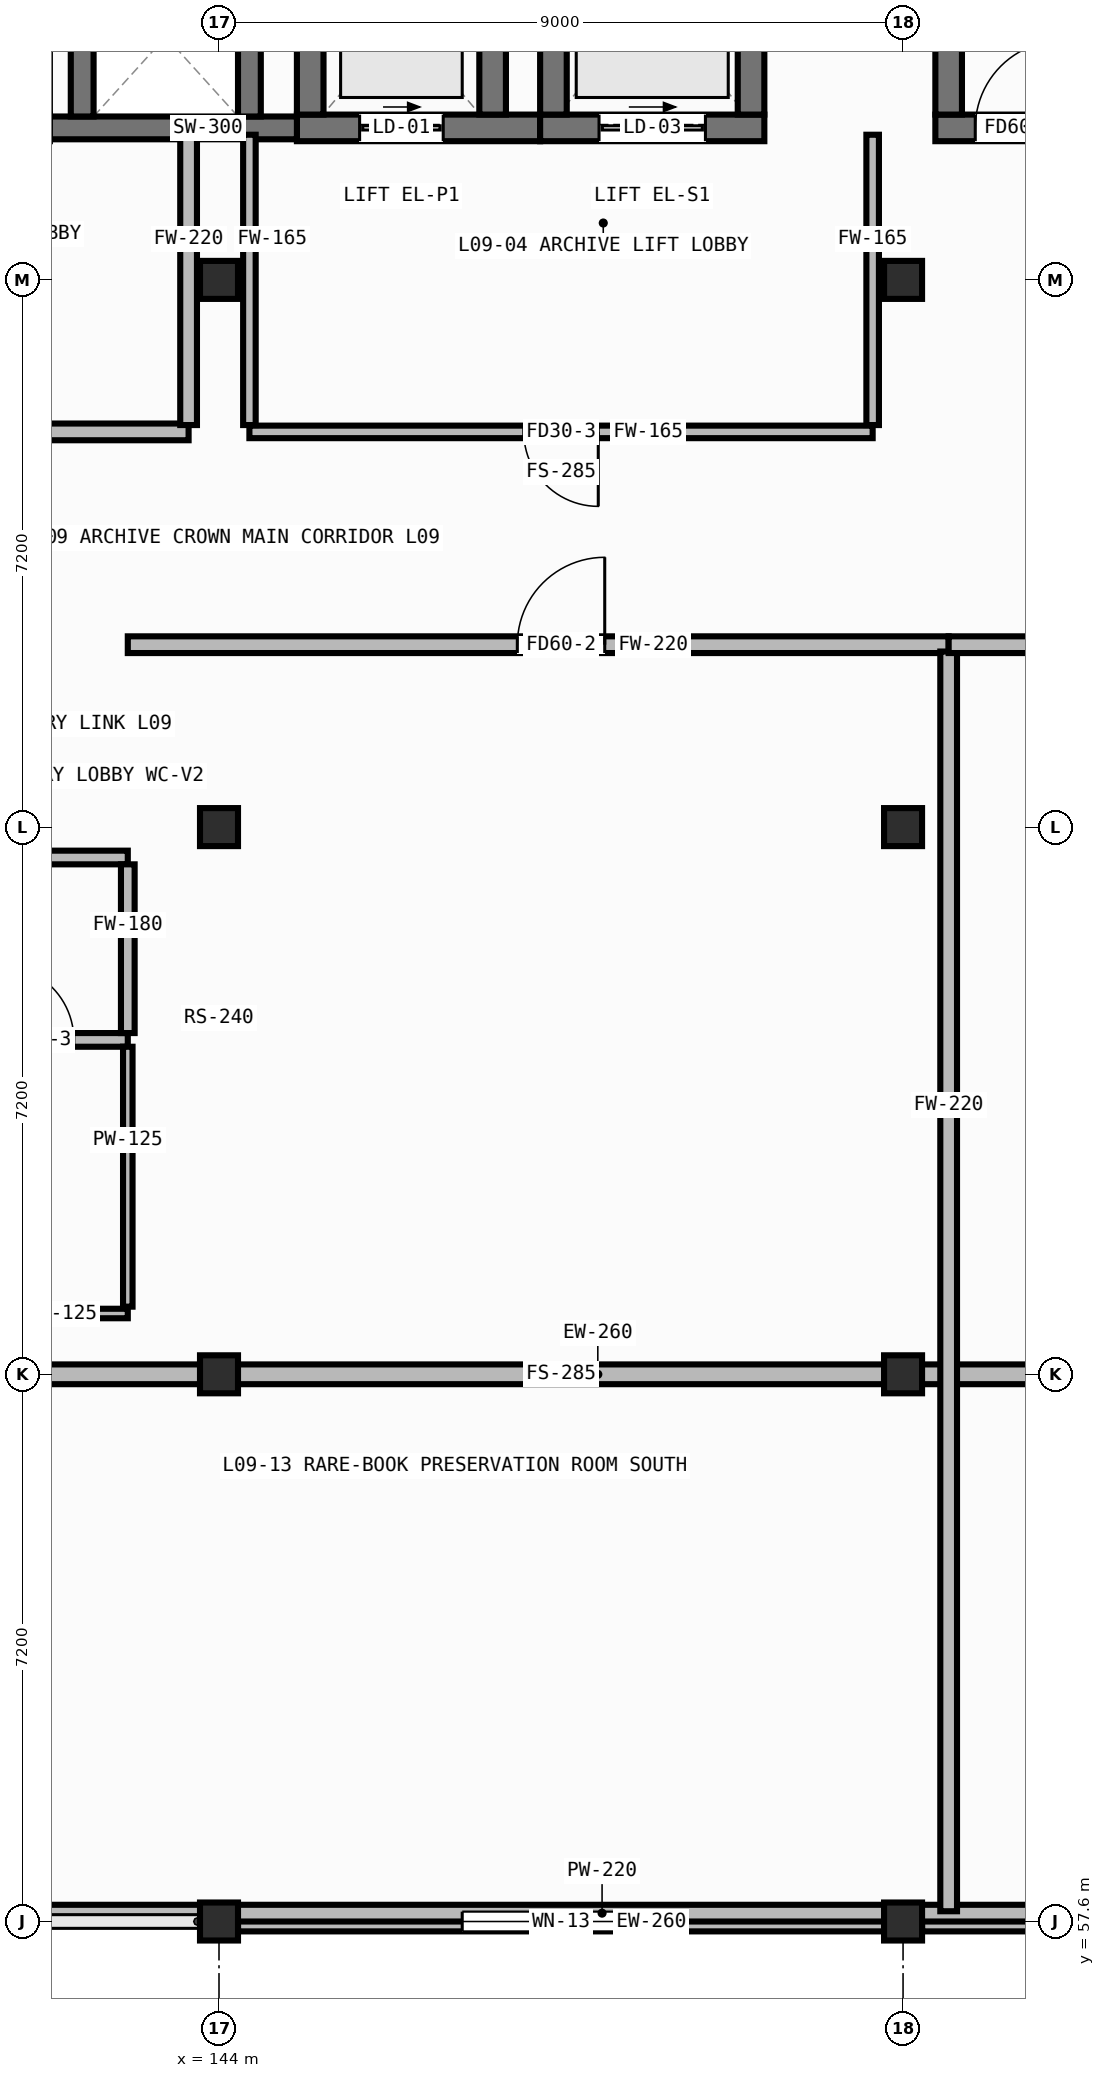
"""IFC4 building model, lengths in metres.
Left out: names, types, materials, properties, quantities, classifications, styles, units other than length and angle.
Written with IfcOpenShell. Run it as: python <this file> out.ifc"""

import sys

from ifc_helpers import new_model, si_unit, direction, frame, frame_2d, origin, origin_2d, place, context, subcontext, project, spatial, rectangle, hollow_rectangle, extrude, element, fill, save


model = new_model("IFC4")
c1 = context("Model", 3, precision=1e-05, world=origin(), true_north=direction((0.0, 1.0)))
c2 = subcontext(c1, "Body", "Model", "MODEL_VIEW")
j1 = project(units=[si_unit("LENGTHUNIT", "METRE"), si_unit("PLANEANGLEUNIT", "RADIAN")], contexts=[c1])
p1 = place(None, origin())
s1 = spatial("IfcSite", under=j1, at=p1, CompositionType="ELEMENT")
p2 = place(p1, origin())
s2 = spatial("IfcBuilding", under=s1, at=p2, CompositionType="ELEMENT")
p3 = place(p2, frame((0.0, 0.0, 31.4)))
s3 = spatial("IfcBuildingStorey", under=s2, at=p3, CompositionType="ELEMENT", Elevation=31.4)
for number, where, z_axis, x_axis in (
    (1, (144.0, 57.6, 0.0), (0.0, 0.0, 1.0), (1.0, 0.0, 0.0)),
    (2, (144.0, 64.8, 0.0), (0.0, 0.0, 1.0), (1.0, 0.0, 0.0)),
    (3, (144.0, 72.0, 0.0), (0.0, 0.0, 1.0), (1.0, 0.0, 0.0)),
    (4, (144.0, 79.2, 0.0), (0.0, 0.0, 1.0), (1.0, 0.0, 0.0)),
    (5, (153.0, 57.6, 0.0), (0.0, 0.0, 1.0), (1.0, 0.0, 0.0)),
    (6, (153.0, 64.8, 0.0), (0.0, 0.0, 1.0), (1.0, 0.0, 0.0)),
    (7, (153.0, 72.0, 0.0), (0.0, 0.0, 1.0), (1.0, 0.0, 0.0)),
    (8, (153.0, 79.2, 0.0), (0.0, 0.0, 1.0), (1.0, 0.0, 0.0)),
):
    element("IfcColumn", number, at=place(p3, frame(where, z_axis=z_axis, x_axis=x_axis)), inside=s3, PredefinedType="COLUMN", context=c2, shape_type="SweptSolid", body=[
        extrude(hollow_rectangle(XDim=0.5, YDim=0.5, WallThickness=0.022, at=origin_2d()), origin(), (0.0, 0.0, 1.0), 3.56),
    ])
p4 = place(p3, frame((144.25, 57.6, 0.0), z_axis=(0.0, 0.0, 1.0), x_axis=(1.0, 0.0, 0.0)))
e9 = element("IfcWall", 9, at=p4, inside=s3, PredefinedType="STANDARD", context=c2, shape_type="SweptSolid", body=[
    extrude(rectangle(XDim=8.5, YDim=0.26, at=frame_2d((4.25, 0.0))), origin(), (0.0, 0.0, 1.0), 3.16),
])
p5 = place(p4, frame((2.95, 0.0, 0.85)))
e10 = element("IfcOpeningElement", 10, at=p5, cuts=e9, PredefinedType="OPENING", context=c2, shape_type="SweptSolid", body=[
    extrude(rectangle(XDim=2.6, YDim=1.6, at=frame_2d((1.3, 0.8))), frame((0.0, 0.142, 0.0), z_axis=(0.0, -1.0, 0.0), x_axis=(1.0, 0.0, 0.0)), (0.0, 0.0, 1.0), 0.284),
])
p6 = place(p3, frame((153.25, 57.6, 0.0), z_axis=(0.0, 0.0, 1.0), x_axis=(1.0, 0.0, 0.0)))
e11 = element("IfcWall", 11, at=p6, inside=s3, PredefinedType="STANDARD", context=c2, shape_type="SweptSolid", body=[
    extrude(rectangle(XDim=8.525, YDim=0.26, at=frame_2d((4.262, 0.0))), origin(), (0.0, 0.0, 1.0), 3.16),
])
p7 = place(p6, frame((2.962, 0.0, 0.85)))
e12 = element("IfcOpeningElement", 12, at=p7, cuts=e11, PredefinedType="OPENING", context=c2, shape_type="SweptSolid", body=[
    extrude(rectangle(XDim=2.6, YDim=1.6, at=frame_2d((1.3, 0.8))), frame((0.0, 0.142, 0.0), z_axis=(0.0, -1.0, 0.0), x_axis=(1.0, 0.0, 0.0)), (0.0, 0.0, 1.0), 0.284),
])
p8 = place(p3, frame((126.2, 64.8, 3.8), z_axis=(0.0, 0.0, 1.0), x_axis=(1.0, 0.0, 0.0)))
e13 = element("IfcWall", 13, at=p8, inside=s3, PredefinedType="STANDARD", context=c2, shape_type="SweptSolid", body=[
    extrude(rectangle(XDim=35.6, YDim=0.26, at=frame_2d((17.8, 0.0))), origin(), (0.0, 0.0, 1.0), 1.92),
])
p9 = place(p3, frame((126.0, 57.71, 3.8), z_axis=(0.0, 0.0, 1.0), x_axis=(1.0, 0.0, 0.0)))
e14 = element("IfcWall", 14, at=p9, inside=s3, PredefinedType="PARAPET", context=c2, shape_type="SweptSolid", body=[
    extrude(rectangle(XDim=36.0, YDim=0.22, at=frame_2d((18.0, 0.0))), origin(), (0.0, 0.0, 1.0), 0.9),
])
p10 = place(p3, frame((153.425, 81.2, 0.0), z_axis=(0.0, 0.0, 1.0), x_axis=(1.0, 0.0, 0.0)))
e15 = element("IfcWall", 15, at=p10, inside=s3, PredefinedType="SHEAR", context=c2, shape_type="SweptSolid", body=[
    extrude(rectangle(XDim=8.15, YDim=0.35, at=frame_2d((4.075, 0.0))), origin(), (0.0, 0.0, 1.0), 3.56),
])
p11 = place(p10, frame((0.525, 0.0, 0.0)))
e16 = element("IfcOpeningElement", 16, at=p11, cuts=e15, PredefinedType="OPENING", context=c2, shape_type="SweptSolid", body=[
    extrude(rectangle(XDim=1.15, YDim=2.1, at=frame_2d((0.575, 1.05))), frame((0.0, 0.187, 0.0), z_axis=(0.0, -1.0, 0.0), x_axis=(1.0, 0.0, 0.0)), (0.0, 0.0, 1.0), 0.374),
])
p12 = place(p3, frame((153.6, 81.375, 0.0), z_axis=(0.0, 0.0, 1.0), x_axis=(0.0, 1.0, 0.0)))
e17 = element("IfcWall", 17, at=p12, inside=s3, PredefinedType="SHEAR", context=c2, shape_type="SweptSolid", body=[
    extrude(rectangle(XDim=3.55, YDim=0.35, at=frame_2d((1.775, 0.0))), origin(), (0.0, 0.0, 1.0), 3.56),
])
p13 = place(p3, frame((145.025, 81.2, 0.0), z_axis=(0.0, 0.0, 1.0), x_axis=(1.0, 0.0, 0.0)))
e18 = element("IfcWall", 18, at=p13, inside=s3, PredefinedType="SHEAR", context=c2, shape_type="SweptSolid", body=[
    extrude(rectangle(XDim=3.2, YDim=0.35, at=frame_2d((1.6, 0.0))), origin(), (0.0, 0.0, 1.0), 4.25),
])
p14 = place(p13, frame((0.825, 0.0, 0.0)))
e19 = element("IfcOpeningElement", 19, at=p14, cuts=e18, PredefinedType="OPENING", context=c2, shape_type="SweptSolid", body=[
    extrude(rectangle(XDim=1.1, YDim=2.1, at=frame_2d((0.55, 1.05))), frame((0.0, 0.187, 0.0), z_axis=(0.0, -1.0, 0.0), x_axis=(1.0, 0.0, 0.0)), (0.0, 0.0, 1.0), 0.374),
])
for number, where, z_axis, x_axis in (
    (20, (145.2, 81.375, 0.0), (0.0, 0.0, 1.0), (0.0, 1.0, 0.0)),
    (21, (147.6, 81.375, 0.0), (0.0, 0.0, 1.0), (0.0, 1.0, 0.0)),
):
    element("IfcWall", number, at=place(p3, frame(where, z_axis=z_axis, x_axis=x_axis)), inside=s3, PredefinedType="SHEAR", context=c2, shape_type="SweptSolid", body=[
        extrude(rectangle(XDim=2.45, YDim=0.35, at=frame_2d((1.225, 0.0))), origin(), (0.0, 0.0, 1.0), 4.25),
    ])
p15 = place(p3, frame((148.225, 81.2, 0.0), z_axis=(0.0, 0.0, 1.0), x_axis=(1.0, 0.0, 0.0)))
e22 = element("IfcWall", 22, at=p15, inside=s3, PredefinedType="SHEAR", context=c2, shape_type="SweptSolid", body=[
    extrude(rectangle(XDim=2.95, YDim=0.35, at=frame_2d((1.475, 0.0))), origin(), (0.0, 0.0, 1.0), 4.25),
])
p16 = place(p15, frame((0.775, 0.0, 0.0)))
e23 = element("IfcOpeningElement", 23, at=p16, cuts=e22, PredefinedType="OPENING", context=c2, shape_type="SweptSolid", body=[
    extrude(rectangle(XDim=1.4, YDim=2.15, at=frame_2d((0.7, 1.075))), frame((0.0, 0.187, 0.0), z_axis=(0.0, -1.0, 0.0), x_axis=(1.0, 0.0, 0.0)), (0.0, 0.0, 1.0), 0.374),
])
for number, where, z_axis, x_axis in (
    (24, (148.4, 81.375, 0.0), (0.0, 0.0, 1.0), (0.0, 1.0, 0.0)),
    (25, (151.0, 81.375, 0.0), (0.0, 0.0, 1.0), (0.0, 1.0, 0.0)),
):
    element("IfcWall", number, at=place(p3, frame(where, z_axis=z_axis, x_axis=x_axis)), inside=s3, PredefinedType="SHEAR", context=c2, shape_type="SweptSolid", body=[
        extrude(rectangle(XDim=3.05, YDim=0.35, at=frame_2d((1.525, 0.0))), origin(), (0.0, 0.0, 1.0), 4.25),
    ])
p17 = place(p3, frame((141.775, 81.2, 0.0), z_axis=(0.0, 0.0, 1.0), x_axis=(1.0, 0.0, 0.0)))
e26 = element("IfcWall", 26, at=p17, inside=s3, PredefinedType="SHEAR", context=c2, shape_type="SweptSolid", body=[
    extrude(rectangle(XDim=3.25, YDim=0.3, at=frame_2d((1.625, 0.0))), origin(), (0.0, 0.0, 1.0), 3.56),
])
for number, where, z_axis, x_axis in (
    (27, (142.2, 81.35, 0.0), (0.0, 0.0, 1.0), (0.0, 1.0, 0.0)),
    (28, (144.4, 81.35, 0.0), (0.0, 0.0, 1.0), (0.0, 1.0, 0.0)),
):
    element("IfcWall", number, at=place(p3, frame(where, z_axis=z_axis, x_axis=x_axis)), inside=s3, PredefinedType="SHEAR", context=c2, shape_type="SweptSolid", body=[
        extrude(rectangle(XDim=2.1, YDim=0.3, at=frame_2d((1.05, 0.0))), origin(), (0.0, 0.0, 1.0), 3.56),
    ])
p18 = place(p3, frame((135.8, 77.2, 0.0), z_axis=(0.0, 0.0, 1.0), x_axis=(1.0, 0.0, 0.0)))
e29 = element("IfcWall", 29, at=p18, inside=s3, PredefinedType="PARTITIONING", context=c2, shape_type="SweptSolid", body=[
    extrude(rectangle(XDim=7.8, YDim=0.22, at=frame_2d((3.9, 0.0))), origin(), (0.0, 0.0, 1.0), 3.56),
])
p19 = place(p18, frame((3.175, 0.0, 0.0)))
e30 = element("IfcOpeningElement", 30, at=p19, cuts=e29, PredefinedType="OPENING", context=c2, shape_type="SweptSolid", body=[
    extrude(rectangle(XDim=1.05, YDim=2.02, at=frame_2d((0.525, 1.01))), frame((0.0, 0.122, 0.0), z_axis=(0.0, -1.0, 0.0), x_axis=(1.0, 0.0, 0.0)), (0.0, 0.0, 1.0), 0.244),
])
p20 = place(p3, frame((143.6, 77.29, 0.0), z_axis=(0.0, 0.0, 1.0), x_axis=(0.0, 1.0, 0.0)))
e31 = element("IfcWall", 31, at=p20, inside=s3, PredefinedType="PARTITIONING", context=c2, shape_type="SweptSolid", body=[
    extrude(rectangle(XDim=3.82, YDim=0.22, at=frame_2d((1.91, 0.0))), origin(), (0.0, 0.0, 1.0), 3.56),
])
p21 = place(p3, frame((144.4, 77.2, 0.0), z_axis=(0.0, 0.0, 1.0), x_axis=(1.0, 0.0, 0.0)))
e32 = element("IfcWall", 32, at=p21, inside=s3, PredefinedType="PARTITIONING", context=c2, shape_type="SweptSolid", body=[
    extrude(rectangle(XDim=8.2, YDim=0.165, at=frame_2d((4.1, 0.0))), origin(), (0.0, 0.0, 1.0), 3.56),
])
p22 = place(p21, frame((3.61, 0.0, 0.0)))
e33 = element("IfcOpeningElement", 33, at=p22, cuts=e32, PredefinedType="OPENING", context=c2, shape_type="SweptSolid", body=[
    extrude(rectangle(XDim=0.98, YDim=2.02, at=frame_2d((0.49, 1.01))), frame((0.0, 0.094, 0.0), z_axis=(0.0, -1.0, 0.0), x_axis=(1.0, 0.0, 0.0)), (0.0, 0.0, 1.0), 0.189),
])
for number, where, z_axis, x_axis in (
    (34, (144.4, 77.29, 0.0), (0.0, 0.0, 1.0), (0.0, 1.0, 0.0)),
    (35, (152.6, 77.29, 0.0), (0.0, 0.0, 1.0), (0.0, 1.0, 0.0)),
):
    element("IfcWall", number, at=place(p3, frame(where, z_axis=z_axis, x_axis=x_axis)), inside=s3, PredefinedType="PARTITIONING", context=c2, shape_type="SweptSolid", body=[
        extrude(rectangle(XDim=3.82, YDim=0.165, at=frame_2d((1.91, 0.0))), origin(), (0.0, 0.0, 1.0), 3.56),
    ])
p23 = place(p3, frame((135.4, 69.2, 0.0), z_axis=(0.0, 0.0, 1.0), x_axis=(1.0, 0.0, 0.0)))
e36 = element("IfcWall", 36, at=p23, inside=s3, PredefinedType="PARTITIONING", context=c2, shape_type="SweptSolid", body=[
    extrude(rectangle(XDim=7.4, YDim=0.18, at=frame_2d((3.7, 0.0))), origin(), (0.0, 0.0, 1.0), 3.56),
])
p24 = place(p23, frame((0.75, 0.0, 0.0)))
e37 = element("IfcOpeningElement", 37, at=p24, cuts=e36, PredefinedType="OPENING", context=c2, shape_type="SweptSolid", body=[
    extrude(rectangle(XDim=1.0, YDim=2.08, at=frame_2d((0.5, 1.04))), frame((0.0, 0.102, 0.0), z_axis=(0.0, -1.0, 0.0), x_axis=(1.0, 0.0, 0.0)), (0.0, 0.0, 1.0), 0.204),
])
p25 = place(p23, frame((3.225, 0.0, 0.0)))
e38 = element("IfcOpeningElement", 38, at=p25, cuts=e36, PredefinedType="OPENING", context=c2, shape_type="SweptSolid", body=[
    extrude(rectangle(XDim=1.05, YDim=2.1, at=frame_2d((0.525, 1.05))), frame((0.0, 0.102, 0.0), z_axis=(0.0, -1.0, 0.0), x_axis=(1.0, 0.0, 0.0)), (0.0, 0.0, 1.0), 0.204),
])
p26 = place(p23, frame((5.71, 0.0, 0.0)))
e39 = element("IfcOpeningElement", 39, at=p26, cuts=e36, PredefinedType="OPENING", context=c2, shape_type="SweptSolid", body=[
    extrude(rectangle(XDim=0.98, YDim=2.02, at=frame_2d((0.49, 1.01))), frame((0.0, 0.102, 0.0), z_axis=(0.0, -1.0, 0.0), x_axis=(1.0, 0.0, 0.0)), (0.0, 0.0, 1.0), 0.204),
])
p27 = place(p3, frame((135.4, 71.6, 0.0), z_axis=(0.0, 0.0, 1.0), x_axis=(1.0, 0.0, 0.0)))
e40 = element("IfcWall", 40, at=p27, inside=s3, PredefinedType="PARTITIONING", context=c2, shape_type="SweptSolid", body=[
    extrude(rectangle(XDim=7.4, YDim=0.18, at=frame_2d((3.7, 0.0))), origin(), (0.0, 0.0, 1.0), 3.56),
])
p28 = place(p27, frame((3.11, 0.0, 0.0)))
e41 = element("IfcOpeningElement", 41, at=p28, cuts=e40, PredefinedType="OPENING", context=c2, shape_type="SweptSolid", body=[
    extrude(rectangle(XDim=0.98, YDim=2.02, at=frame_2d((0.49, 1.01))), frame((0.0, 0.102, 0.0), z_axis=(0.0, -1.0, 0.0), x_axis=(1.0, 0.0, 0.0)), (0.0, 0.0, 1.0), 0.204),
])
p29 = place(p3, frame((142.8, 69.29, 0.0), z_axis=(0.0, 0.0, 1.0), x_axis=(0.0, 1.0, 0.0)))
e42 = element("IfcWall", 42, at=p29, inside=s3, PredefinedType="PARTITIONING", context=c2, shape_type="SweptSolid", body=[
    extrude(rectangle(XDim=2.22, YDim=0.18, at=frame_2d((1.11, 0.0))), origin(), (0.0, 0.0, 1.0), 3.56),
])
p30 = place(p3, frame((140.4, 65.6, 0.0), z_axis=(0.0, 0.0, 1.0), x_axis=(1.0, 0.0, 0.0)))
e43 = element("IfcWall", 43, at=p30, inside=s3, PredefinedType="PARTITIONING", context=c2, shape_type="SweptSolid", body=[
    extrude(rectangle(XDim=2.4, YDim=0.125, at=frame_2d((1.2, 0.0))), origin(), (0.0, 0.0, 1.0), 3.56),
])
p31 = place(p3, frame((142.8, 65.69, 0.0), z_axis=(0.0, 0.0, 1.0), x_axis=(0.0, 1.0, 0.0)))
e44 = element("IfcWall", 44, at=p31, inside=s3, PredefinedType="PARTITIONING", context=c2, shape_type="SweptSolid", body=[
    extrude(rectangle(XDim=3.42, YDim=0.125, at=frame_2d((1.71, 0.0))), origin(), (0.0, 0.0, 1.0), 3.56),
])
p32 = place(p3, frame((142.8, 74.4, 0.0), z_axis=(0.0, 0.0, 1.0), x_axis=(1.0, 0.0, 0.0)))
e45 = element("IfcWall", 45, at=p32, inside=s3, PredefinedType="PARTITIONING", context=c2, shape_type="SweptSolid", body=[
    extrude(rectangle(XDim=10.8, YDim=0.22, at=frame_2d((5.4, 0.0))), origin(), (0.0, 0.0, 1.0), 3.56),
])
p33 = place(p32, frame((5.125, 0.0, 0.0)))
e46 = element("IfcOpeningElement", 46, at=p33, cuts=e45, PredefinedType="OPENING", context=c2, shape_type="SweptSolid", body=[
    extrude(rectangle(XDim=1.15, YDim=2.1, at=frame_2d((0.575, 1.05))), frame((0.0, 0.122, 0.0), z_axis=(0.0, -1.0, 0.0), x_axis=(1.0, 0.0, 0.0)), (0.0, 0.0, 1.0), 0.244),
])
p34 = place(p3, frame((153.6, 57.735, 0.0), z_axis=(0.0, 0.0, 1.0), x_axis=(0.0, 1.0, 0.0)))
e47 = element("IfcWall", 47, at=p34, inside=s3, PredefinedType="PARTITIONING", context=c2, shape_type="SweptSolid", body=[
    extrude(rectangle(XDim=16.575, YDim=0.22, at=frame_2d((8.288, 0.0))), origin(), (0.0, 0.0, 1.0), 3.56),
])
p35 = place(p3, frame((153.6, 74.4, 0.0), z_axis=(0.0, 0.0, 1.0), x_axis=(1.0, 0.0, 0.0)))
e48 = element("IfcWall", 48, at=p35, inside=s3, PredefinedType="PARTITIONING", context=c2, shape_type="SweptSolid", body=[
    extrude(rectangle(XDim=8.265, YDim=0.22, at=frame_2d((4.132, 0.0))), origin(), (0.0, 0.0, 1.0), 3.56),
])
p36 = place(p35, frame((3.375, 0.0, 0.0)))
e49 = element("IfcOpeningElement", 49, at=p36, cuts=e48, PredefinedType="OPENING", context=c2, shape_type="SweptSolid", body=[
    extrude(rectangle(XDim=1.05, YDim=2.02, at=frame_2d((0.525, 1.01))), frame((0.0, 0.122, 0.0), z_axis=(0.0, -1.0, 0.0), x_axis=(1.0, 0.0, 0.0)), (0.0, 0.0, 1.0), 0.244),
])
p37 = place(p5, origin())
e50 = element("IfcWindow", 50, at=p37, inside=s3, PartitioningType="DOUBLE_PANEL_VERTICAL", PredefinedType="WINDOW", context=c2, shape_type="SweptSolid", body=[
    extrude(rectangle(XDim=2.6, YDim=1.6, at=frame_2d((1.3, 0.8))), frame((0.0, 0.03, 0.0), z_axis=(0.0, -1.0, 0.0), x_axis=(1.0, 0.0, 0.0)), (0.0, 0.0, 1.0), 0.06),
])
fill(e10, e50)
p38 = place(p11, origin())
e51 = element("IfcDoor", 51, at=p38, inside=s3, OperationType="SINGLE_SWING_RIGHT", PredefinedType="DOOR", context=c2, shape_type="SweptSolid", body=[
    extrude(rectangle(XDim=1.15, YDim=2.1, at=frame_2d((0.575, 1.05))), frame((0.0, 0.025, 0.0), z_axis=(0.0, -1.0, 0.0), x_axis=(1.0, 0.0, 0.0)), (0.0, 0.0, 1.0), 0.05),
])
fill(e16, e51)
p39 = place(p14, origin())
e52 = element("IfcDoor", 52, at=p39, inside=s3, OperationType="SLIDING_TO_LEFT", PredefinedType="DOOR", context=c2, shape_type="SweptSolid", body=[
    extrude(rectangle(XDim=1.1, YDim=2.1, at=frame_2d((0.55, 1.05))), frame((0.0, 0.025, 0.0), z_axis=(0.0, -1.0, 0.0), x_axis=(1.0, 0.0, 0.0)), (0.0, 0.0, 1.0), 0.05),
])
fill(e19, e52)
p40 = place(p16, origin())
e53 = element("IfcDoor", 53, at=p40, inside=s3, OperationType="SLIDING_TO_LEFT", PredefinedType="DOOR", context=c2, shape_type="SweptSolid", body=[
    extrude(rectangle(XDim=1.4, YDim=2.15, at=frame_2d((0.7, 1.075))), frame((0.0, 0.025, 0.0), z_axis=(0.0, -1.0, 0.0), x_axis=(1.0, 0.0, 0.0)), (0.0, 0.0, 1.0), 0.05),
])
fill(e23, e53)
p41 = place(p22, frame((0.98, 0.0, 0.0), z_axis=(0.0, 0.0, 1.0), x_axis=(-1.0, 0.0, 0.0)))
e54 = element("IfcDoor", 54, at=p41, inside=s3, OperationType="SINGLE_SWING_LEFT", PredefinedType="DOOR", context=c2, shape_type="SweptSolid", body=[
    extrude(rectangle(XDim=0.98, YDim=2.02, at=frame_2d((0.49, 1.01))), frame((0.0, 0.025, 0.0), z_axis=(0.0, -1.0, 0.0), x_axis=(1.0, 0.0, 0.0)), (0.0, 0.0, 1.0), 0.05),
])
fill(e33, e54)
p42 = place(p26, origin())
e55 = element("IfcDoor", 55, at=p42, inside=s3, OperationType="SINGLE_SWING_LEFT", PredefinedType="DOOR", context=c2, shape_type="SweptSolid", body=[
    extrude(rectangle(XDim=0.98, YDim=2.02, at=frame_2d((0.49, 1.01))), frame((0.0, 0.025, 0.0), z_axis=(0.0, -1.0, 0.0), x_axis=(1.0, 0.0, 0.0)), (0.0, 0.0, 1.0), 0.05),
])
fill(e39, e55)
p43 = place(p33, origin())
e56 = element("IfcDoor", 56, at=p43, inside=s3, OperationType="SINGLE_SWING_RIGHT", PredefinedType="DOOR", context=c2, shape_type="SweptSolid", body=[
    extrude(rectangle(XDim=1.15, YDim=2.1, at=frame_2d((0.575, 1.05))), frame((0.0, 0.025, 0.0), z_axis=(0.0, -1.0, 0.0), x_axis=(1.0, 0.0, 0.0)), (0.0, 0.0, 1.0), 0.05),
])
fill(e46, e56)
save(model, sys.argv[1])
